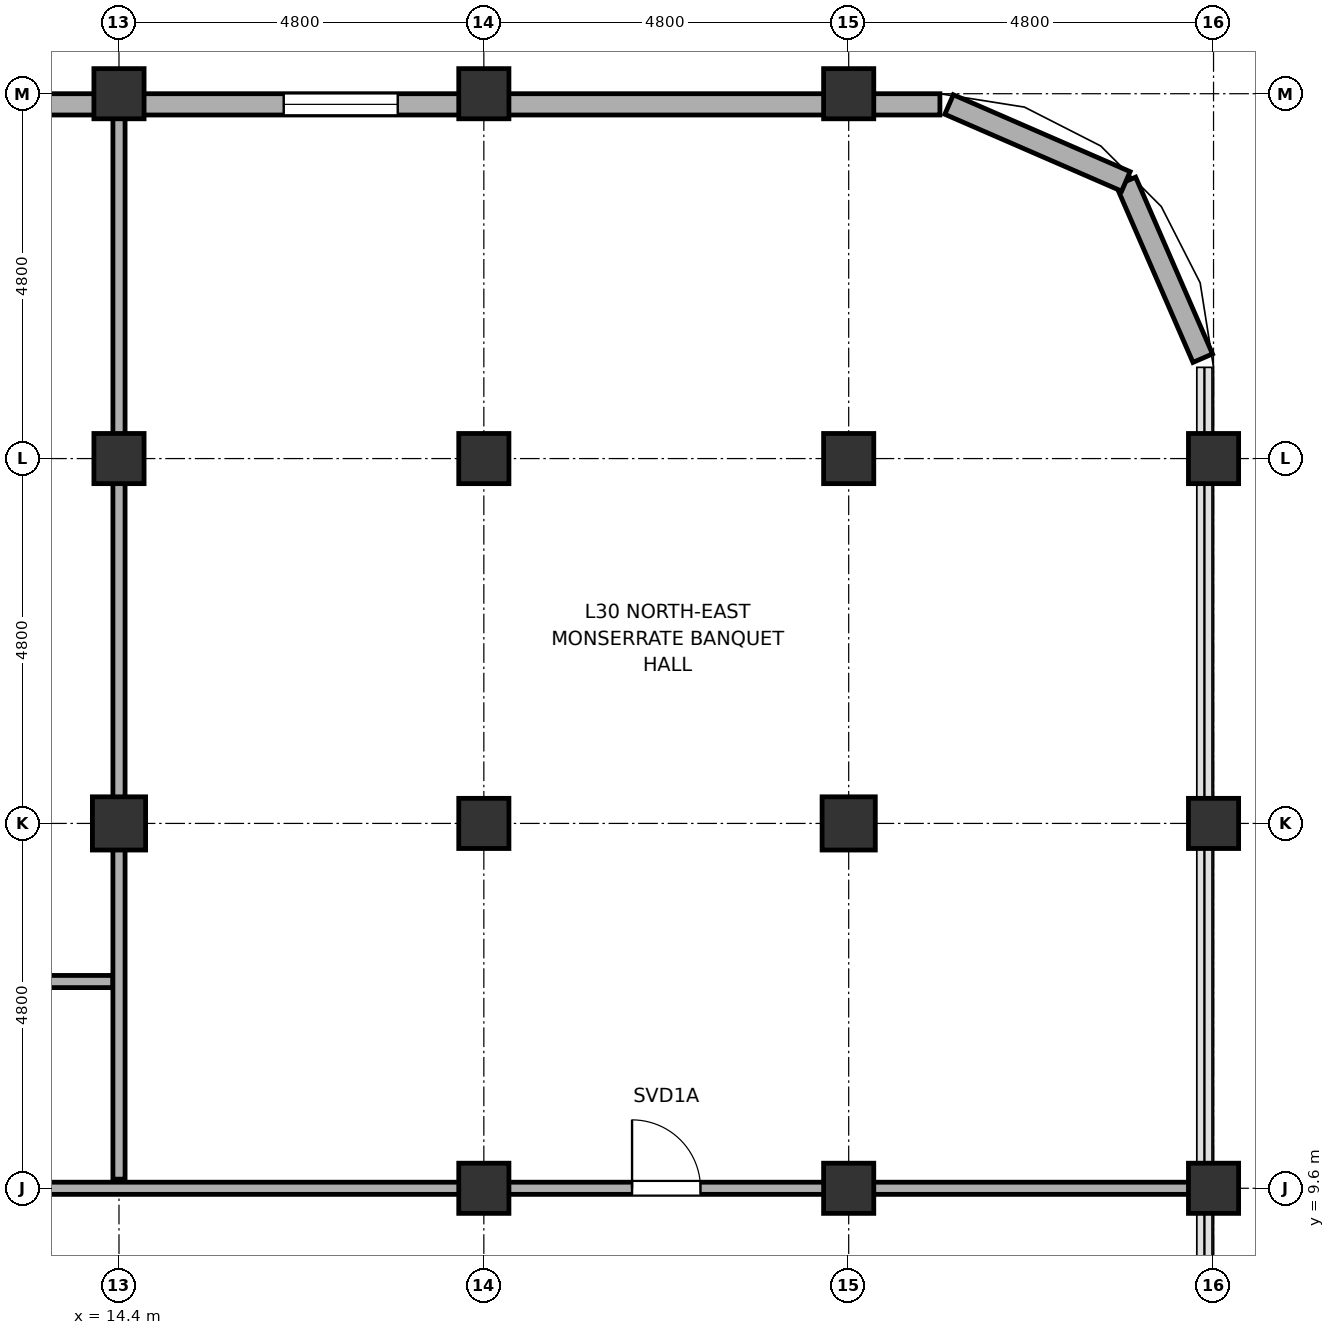
"""IFC4 building model, lengths in metres.
Left out: names, types, materials, properties, quantities, classifications, styles, units other than length and angle.
Written with IfcOpenShell. Run it as: python <this file> out.ifc"""

import sys

from ifc_helpers import new_model, si_unit, direction, frame, frame_2d, origin, origin_2d, place, context, subcontext, project, spatial, rectangle, hollow_rectangle, hollow_circle, extrude, element, fill, save


model = new_model("IFC4")
c1 = context("Model", 3, precision=1e-05, world=origin(), true_north=direction((0.0, 1.0)))
c2 = subcontext(c1, "Body", "Model", "MODEL_VIEW")
j1 = project(units=[si_unit("LENGTHUNIT", "METRE"), si_unit("PLANEANGLEUNIT", "RADIAN")], contexts=[c1])
p1 = place(None, origin())
s1 = spatial("IfcSite", under=j1, at=p1, CompositionType="ELEMENT")
p2 = place(p1, origin())
s2 = spatial("IfcBuilding", under=s1, at=p2, CompositionType="ELEMENT")
p3 = place(p2, frame((0.0, 0.0, 124.8)))
s3 = spatial("IfcBuildingStorey", under=s2, at=p3, CompositionType="ELEMENT", Elevation=124.8)
p4 = place(p3, frame((14.4, 14.4, 0.0), z_axis=(0.0, 0.0, 1.0), x_axis=(1.0, 0.0, 0.0)))
e1 = element("IfcColumn", 1, at=p4, inside=s3, PredefinedType="COLUMN", context=c2, shape_type="SweptSolid", body=[
    extrude(hollow_rectangle(XDim=0.7, YDim=0.7, WallThickness=0.032, at=origin_2d()), origin(), (0.0, 0.0, 1.0), 3.7),
])
for number, where, z_axis, x_axis in (
    (2, (14.4, 19.2, 0.0), (0.0, 0.0, 1.0), (1.0, 0.0, 0.0)),
    (3, (14.4, 24.0, 0.0), (0.0, 0.0, 1.0), (1.0, 0.0, 0.0)),
    (4, (19.2, 9.6, 0.0), (0.0, 0.0, 1.0), (1.0, 0.0, 0.0)),
    (5, (19.2, 14.4, 0.0), (0.0, 0.0, 1.0), (1.0, 0.0, 0.0)),
    (6, (19.2, 19.2, 0.0), (0.0, 0.0, 1.0), (1.0, 0.0, 0.0)),
    (7, (19.2, 24.0, 0.0), (0.0, 0.0, 1.0), (1.0, 0.0, 0.0)),
    (8, (24.0, 9.6, 0.0), (0.0, 0.0, 1.0), (1.0, 0.0, 0.0)),
):
    element("IfcColumn", number, at=place(p3, frame(where, z_axis=z_axis, x_axis=x_axis)), inside=s3, PredefinedType="COLUMN", context=c2, shape_type="SweptSolid", body=[
        extrude(hollow_circle(Radius=0.33, WallThickness=0.028, at=origin_2d()), origin(), (0.0, 0.0, 1.0), 3.7),
    ])
p5 = place(p3, frame((24.0, 14.4, 0.0), z_axis=(0.0, 0.0, 1.0), x_axis=(1.0, 0.0, 0.0)))
e9 = element("IfcColumn", 9, at=p5, inside=s3, PredefinedType="COLUMN", context=c2, shape_type="SweptSolid", body=[
    extrude(hollow_rectangle(XDim=0.7, YDim=0.7, WallThickness=0.032, at=origin_2d()), origin(), (0.0, 0.0, 1.0), 3.7),
])
for number, where, z_axis, x_axis in (
    (10, (24.0, 19.2, 0.0), (0.0, 0.0, 1.0), (1.0, 0.0, 0.0)),
    (11, (24.0, 24.0, 0.0), (0.0, 0.0, 1.0), (1.0, 0.0, 0.0)),
    (12, (28.8, 9.6, 0.0), (0.0, 0.0, 1.0), (1.0, 0.0, 0.0)),
    (13, (28.8, 14.4, 0.0), (0.0, 0.0, 1.0), (1.0, 0.0, 0.0)),
    (14, (28.8, 19.2, 0.0), (0.0, 0.0, 1.0), (1.0, 0.0, 0.0)),
):
    element("IfcColumn", number, at=place(p3, frame(where, z_axis=z_axis, x_axis=x_axis)), inside=s3, PredefinedType="COLUMN", context=c2, shape_type="SweptSolid", body=[
        extrude(hollow_circle(Radius=0.33, WallThickness=0.028, at=origin_2d()), origin(), (0.0, 0.0, 1.0), 3.7),
    ])
p6 = place(p3, frame((28.658, 20.521, 0.0), z_axis=(0.0, 0.0, 1.0), x_axis=(-0.398792985289, 0.917040977756, 0.0)))
e15 = element("IfcWall", 15, at=p6, inside=s3, PredefinedType="SOLIDWALL", context=c2, shape_type="SweptSolid", body=[
    extrude(rectangle(XDim=2.536, YDim=0.28, at=frame_2d((1.268, 0.0))), origin(), (0.0, 0.0, 1.0), 2.12),
])
p7 = place(p3, frame((27.646, 22.847, 0.0), z_axis=(0.0, 0.0, 1.0), x_axis=(-0.917060872934, 0.398747232384, 0.0)))
e16 = element("IfcWall", 16, at=p7, inside=s3, PredefinedType="SOLIDWALL", context=c2, shape_type="SweptSolid", body=[
    extrude(rectangle(XDim=2.536, YDim=0.28, at=frame_2d((1.268, 0.0))), origin(), (0.0, 0.0, 1.0), 2.12),
])
p8 = place(p3, frame((4.75, 23.86, 0.0), z_axis=(0.0, 0.0, 1.0), x_axis=(1.0, 0.0, 0.0)))
e17 = element("IfcWall", 17, at=p8, inside=s3, PredefinedType="SOLIDWALL", context=c2, shape_type="SweptSolid", body=[
    extrude(rectangle(XDim=20.45, YDim=0.28, at=frame_2d((10.225, 0.0))), origin(), (0.0, 0.0, 1.0), 2.12),
])
p9 = place(p8, frame((11.817, 0.0, 0.75)))
e18 = element("IfcOpeningElement", 18, at=p9, cuts=e17, PredefinedType="OPENING", context=c2, shape_type="SweptSolid", body=[
    extrude(rectangle(XDim=1.5, YDim=1.15, at=frame_2d((0.75, 0.575))), frame((0.0, 0.155, 0.0), z_axis=(0.0, -1.0, 0.0), x_axis=(1.0, 0.0, 0.0)), (0.0, 0.0, 1.0), 0.31),
])
p10 = place(p8, frame((1.7, 0.0, 0.75)))
e19 = element("IfcOpeningElement", 19, at=p10, cuts=e17, PredefinedType="OPENING", context=c2, shape_type="SweptSolid", body=[
    extrude(rectangle(XDim=1.5, YDim=1.15, at=frame_2d((0.75, 0.575))), frame((0.0, 0.155, 0.0), z_axis=(0.0, -1.0, 0.0), x_axis=(1.0, 0.0, 0.0)), (0.0, 0.0, 1.0), 0.31),
])
p11 = place(p8, frame((6.5, 0.0, 0.75)))
e20 = element("IfcOpeningElement", 20, at=p11, cuts=e17, PredefinedType="OPENING", context=c2, shape_type="SweptSolid", body=[
    extrude(rectangle(XDim=1.5, YDim=1.15, at=frame_2d((0.75, 0.575))), frame((0.0, 0.155, 0.0), z_axis=(0.0, -1.0, 0.0), x_axis=(1.0, 0.0, 0.0)), (0.0, 0.0, 1.0), 0.31),
])
p12 = place(p3, frame((-14.32, 9.6, 0.0), z_axis=(0.0, 0.0, 1.0), x_axis=(1.0, 0.0, 0.0)))
e21 = element("IfcWall", 21, at=p12, inside=s3, PredefinedType="PARTITIONING", context=c2, shape_type="SweptSolid", body=[
    extrude(rectangle(XDim=42.95, YDim=0.16, at=frame_2d((21.475, 0.0))), origin(), (0.0, 0.0, 1.0), 2.12),
])
p13 = place(p12, frame((35.47, 0.0, 0.0)))
e22 = element("IfcOpeningElement", 22, at=p13, cuts=e21, PredefinedType="OPENING", context=c2, shape_type="SweptSolid", body=[
    extrude(rectangle(XDim=0.9, YDim=2.02, at=frame_2d((0.45, 1.01))), frame((0.0, 0.095, 0.0), z_axis=(0.0, -1.0, 0.0), x_axis=(1.0, 0.0, 0.0)), (0.0, 0.0, 1.0), 0.19),
])
p14 = place(p12, frame((0.67, 0.0, 0.0)))
e23 = element("IfcOpeningElement", 23, at=p14, cuts=e21, PredefinedType="OPENING", context=c2, shape_type="SweptSolid", body=[
    extrude(rectangle(XDim=0.9, YDim=2.02, at=frame_2d((0.45, 1.01))), frame((0.0, 0.095, 0.0), z_axis=(0.0, -1.0, 0.0), x_axis=(1.0, 0.0, 0.0)), (0.0, 0.0, 1.0), 0.19),
])
p15 = place(p12, frame((2.56, 0.0, 0.0)))
e24 = element("IfcOpeningElement", 24, at=p15, cuts=e21, PredefinedType="OPENING", context=c2, shape_type="SweptSolid", body=[
    extrude(rectangle(XDim=0.9, YDim=2.02, at=frame_2d((0.45, 1.01))), frame((0.0, 0.095, 0.0), z_axis=(0.0, -1.0, 0.0), x_axis=(1.0, 0.0, 0.0)), (0.0, 0.0, 1.0), 0.19),
])
p16 = place(p12, frame((6.09, 0.0, 0.0)))
e25 = element("IfcOpeningElement", 25, at=p16, cuts=e21, PredefinedType="OPENING", context=c2, shape_type="SweptSolid", body=[
    extrude(rectangle(XDim=0.92, YDim=2.02, at=frame_2d((0.46, 1.01))), frame((0.0, 0.095, 0.0), z_axis=(0.0, -1.0, 0.0), x_axis=(1.0, 0.0, 0.0)), (0.0, 0.0, 1.0), 0.19),
])
p17 = place(p12, frame((12.03, 0.0, 0.0)))
e26 = element("IfcOpeningElement", 26, at=p17, cuts=e21, PredefinedType="OPENING", context=c2, shape_type="SweptSolid", body=[
    extrude(rectangle(XDim=0.92, YDim=2.02, at=frame_2d((0.46, 1.01))), frame((0.0, 0.095, 0.0), z_axis=(0.0, -1.0, 0.0), x_axis=(1.0, 0.0, 0.0)), (0.0, 0.0, 1.0), 0.19),
])
p18 = place(p12, frame((15.69, 0.0, 0.0)))
e27 = element("IfcOpeningElement", 27, at=p18, cuts=e21, PredefinedType="OPENING", context=c2, shape_type="SweptSolid", body=[
    extrude(rectangle(XDim=0.92, YDim=2.02, at=frame_2d((0.46, 1.01))), frame((0.0, 0.095, 0.0), z_axis=(0.0, -1.0, 0.0), x_axis=(1.0, 0.0, 0.0)), (0.0, 0.0, 1.0), 0.19),
])
p19 = place(p12, frame((21.63, 0.0, 0.0)))
e28 = element("IfcOpeningElement", 28, at=p19, cuts=e21, PredefinedType="OPENING", context=c2, shape_type="SweptSolid", body=[
    extrude(rectangle(XDim=0.92, YDim=2.02, at=frame_2d((0.46, 1.01))), frame((0.0, 0.095, 0.0), z_axis=(0.0, -1.0, 0.0), x_axis=(1.0, 0.0, 0.0)), (0.0, 0.0, 1.0), 0.19),
])
p20 = place(p12, frame((25.29, 0.0, 0.0)))
e29 = element("IfcOpeningElement", 29, at=p20, cuts=e21, PredefinedType="OPENING", context=c2, shape_type="SweptSolid", body=[
    extrude(rectangle(XDim=0.92, YDim=2.02, at=frame_2d((0.46, 1.01))), frame((0.0, 0.095, 0.0), z_axis=(0.0, -1.0, 0.0), x_axis=(1.0, 0.0, 0.0)), (0.0, 0.0, 1.0), 0.19),
])
p21 = place(p3, frame((12.19, 12.32, 0.0), z_axis=(0.0, 0.0, 1.0), x_axis=(1.0, 0.0, 0.0)))
e30 = element("IfcWall", 30, at=p21, inside=s3, PredefinedType="PARTITIONING", context=c2, shape_type="SweptSolid", body=[
    extrude(rectangle(XDim=2.13, YDim=0.16, at=frame_2d((1.065, 0.0))), origin(), (0.0, 0.0, 1.0), 2.87),
])
p22 = place(p3, frame((14.4, 9.72, 0.0), z_axis=(0.0, 0.0, 1.0), x_axis=(0.0, 1.0, 0.0)))
e31 = element("IfcWall", 31, at=p22, inside=s3, PredefinedType="PARTITIONING", context=c2, shape_type="SweptSolid", body=[
    extrude(rectangle(XDim=13.99, YDim=0.16, at=frame_2d((6.995, 0.0))), origin(), (0.0, 0.0, 1.0), 2.12),
])
p23 = place(p9, origin())
e32 = element("IfcWindow", 32, at=p23, inside=s3, PartitioningType="SINGLE_PANEL", PredefinedType="WINDOW", context=c2, shape_type="SweptSolid", body=[
    extrude(rectangle(XDim=1.5, YDim=1.15, at=frame_2d((0.75, 0.575))), frame((0.0, 0.03, 0.0), z_axis=(0.0, -1.0, 0.0), x_axis=(1.0, 0.0, 0.0)), (0.0, 0.0, 1.0), 0.06),
])
fill(e18, e32)
p24 = place(p13, origin())
e33 = element("IfcDoor", 33, at=p24, inside=s3, OperationType="SINGLE_SWING_LEFT", PredefinedType="DOOR", context=c2, shape_type="SweptSolid", body=[
    extrude(rectangle(XDim=0.9, YDim=2.02, at=frame_2d((0.45, 1.01))), frame((0.0, 0.025, 0.0), z_axis=(0.0, -1.0, 0.0), x_axis=(1.0, 0.0, 0.0)), (0.0, 0.0, 1.0), 0.05),
])
fill(e22, e33)
save(model, sys.argv[1])
